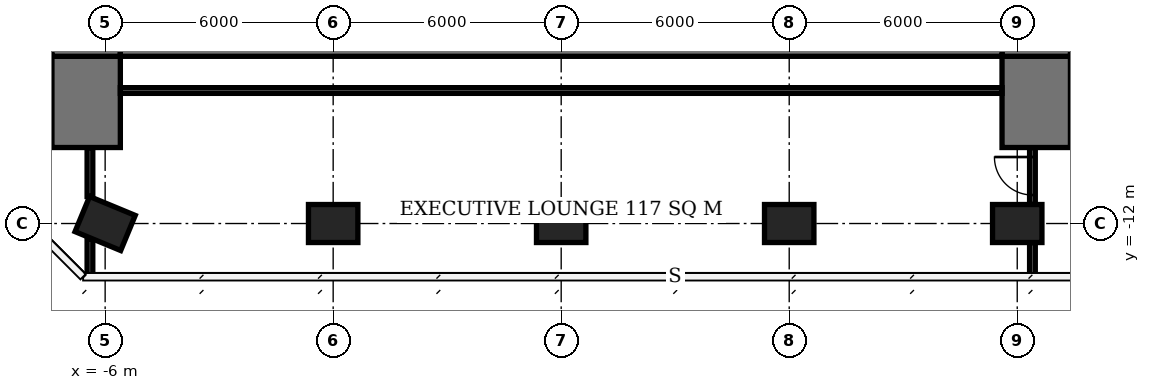
"""IFC4 building model, lengths in metres.
Left out: names, types, materials, properties, quantities, classifications, styles, units other than length and angle.
Written with IfcOpenShell. Run it as: python <this file> out.ifc"""

import sys

from ifc_helpers import new_model, si_unit, direction, frame, frame_2d, origin, origin_2d, place, context, subcontext, project, spatial, rectangle, extrude, element, fill, save


model = new_model("IFC4")
c1 = context("Model", 3, precision=1e-05, world=origin(), true_north=direction((0.0, 1.0)))
c2 = subcontext(c1, "Body", "Model", "MODEL_VIEW")
j1 = project(units=[si_unit("LENGTHUNIT", "METRE"), si_unit("PLANEANGLEUNIT", "RADIAN")], contexts=[c1])
p1 = place(None, origin())
s1 = spatial("IfcSite", under=j1, at=p1, CompositionType="ELEMENT")
p2 = place(p1, origin())
s2 = spatial("IfcBuilding", under=s1, at=p2, CompositionType="ELEMENT")
p3 = place(p2, frame((0.0, 0.0, 252.8)))
s3 = spatial("IfcBuildingStorey", under=s2, at=p3, CompositionType="ELEMENT", Elevation=252.8)
for number, where, z_axis, x_axis in (
    (1, (-6.0, -12.0, 0.0), (0.0, 0.0, 1.0), (-0.924, 0.383, 0.0)),
    (2, (0.0, -12.0, 0.0), (0.0, 0.0, 1.0), (1.0, 0.0, 0.0)),
    (3, (6.0, -12.0, 0.0), (0.0, 0.0, 1.0), (1.0, 0.0, 0.0)),
    (4, (12.0, -12.0, 0.0), (0.0, 0.0, 1.0), (1.0, 0.0, 0.0)),
    (5, (18.0, -12.0, 0.0), (0.0, 0.0, 1.0), (1.0, 0.0, 0.0)),
):
    element("IfcColumn", number, at=place(p3, frame(where, z_axis=z_axis, x_axis=x_axis)), inside=s3, PredefinedType="COLUMN", context=c2, shape_type="SweptSolid", body=[
        extrude(rectangle(XDim=1.3, YDim=1.0, at=origin_2d()), origin(), (0.0, 0.0, 1.0), 3.9),
    ])
p4 = place(p3, frame((-5.6, -6.6, 0.0), z_axis=(0.0, 0.0, 1.0), x_axis=(1.0, 0.0, 0.0)))
e6 = element("IfcWall", 6, at=p4, inside=s3, PredefinedType="SHEAR", context=c2, shape_type="SweptSolid", body=[
    extrude(rectangle(XDim=23.2, YDim=2.0, at=frame_2d((11.6, 0.0))), origin(), (0.0, 0.0, 1.0), 3.9),
])
p5 = place(p3, frame((-6.5, -7.6, 0.0), z_axis=(0.0, 0.0, 1.0), x_axis=(0.0, 1.0, 0.0)))
e7 = element("IfcWall", 7, at=p5, inside=s3, PredefinedType="SHEAR", context=c2, shape_type="SweptSolid", body=[
    extrude(rectangle(XDim=21.2, YDim=1.8, at=frame_2d((10.6, 0.0))), origin(), (0.0, 0.0, 1.0), 3.9),
])
p6 = place(p5, frame((7.8, 0.0, 0.0)))
e8 = element("IfcOpeningElement", 8, at=p6, cuts=e7, PredefinedType="OPENING", context=c2, shape_type="SweptSolid", body=[
    extrude(rectangle(XDim=1.8, YDim=2.4, at=frame_2d((0.9, 1.2))), frame((0.0, 0.91, 0.0), z_axis=(0.0, -1.0, 0.0), x_axis=(1.0, 0.0, 0.0)), (0.0, 0.0, 1.0), 1.82),
])
p7 = place(p3, frame((18.5, -7.6, 0.0), z_axis=(0.0, 0.0, 1.0), x_axis=(0.0, 1.0, 0.0)))
e9 = element("IfcWall", 9, at=p7, inside=s3, PredefinedType="SHEAR", context=c2, shape_type="SweptSolid", body=[
    extrude(rectangle(XDim=21.2, YDim=1.8, at=frame_2d((10.6, 0.0))), origin(), (0.0, 0.0, 1.0), 3.9),
])
p8 = place(p7, frame((9.2, 0.0, 0.0)))
e10 = element("IfcOpeningElement", 10, at=p8, cuts=e9, PredefinedType="OPENING", context=c2, shape_type="SweptSolid", body=[
    extrude(rectangle(XDim=1.8, YDim=2.4, at=frame_2d((0.9, 1.2))), frame((0.0, 0.91, 0.0), z_axis=(0.0, -1.0, 0.0), x_axis=(1.0, 0.0, 0.0)), (0.0, 0.0, 1.0), 1.82),
])
for number, where, z_axis, x_axis in (
    (11, (-6.5, -10.0, 0.0), (0.0, 0.0, 1.0), (0.0, 1.0, 0.0)),
    (12, (18.5, -10.0, 0.0), (0.0, 0.0, 1.0), (0.0, 1.0, 0.0)),
):
    element("IfcWall", number, at=place(p3, frame(where, z_axis=z_axis, x_axis=x_axis)), inside=s3, PredefinedType="SHEAR", context=c2, shape_type="SweptSolid", body=[
        extrude(rectangle(XDim=2.4, YDim=1.8, at=frame_2d((1.2, 0.0))), origin(), (0.0, 0.0, 1.0), 3.9),
    ])
p9 = place(p3, frame((-6.4, -13.375, 0.0), z_axis=(0.0, 0.0, 1.0), x_axis=(0.0, 1.0, 0.0)))
e13 = element("IfcWall", 13, at=p9, inside=s3, PredefinedType="PARTITIONING", context=c2, shape_type="SweptSolid", body=[
    extrude(rectangle(XDim=0.969, YDim=0.15, at=frame_2d((0.484, 0.0))), origin(), (0.0, 0.0, 1.0), 3.65),
])
p10 = place(p3, frame((-6.4, -11.289, 0.0), z_axis=(0.0, 0.0, 1.0), x_axis=(0.0, 1.0, 0.0)))
e14 = element("IfcWall", 14, at=p10, inside=s3, PredefinedType="PARTITIONING", context=c2, shape_type="SweptSolid", body=[
    extrude(rectangle(XDim=1.289, YDim=0.15, at=frame_2d((0.645, 0.0))), origin(), (0.0, 0.0, 1.0), 3.65),
])
p11 = place(p3, frame((-5.6, -8.5, 0.0), z_axis=(0.0, 0.0, 1.0), x_axis=(1.0, 0.0, 0.0)))
e15 = element("IfcWall", 15, at=p11, inside=s3, PredefinedType="PARTITIONING", context=c2, shape_type="SweptSolid", body=[
    extrude(rectangle(XDim=23.2, YDim=0.15, at=frame_2d((11.6, 0.0))), origin(), (0.0, 0.0, 1.0), 3.65),
])
p12 = place(p3, frame((18.4, -13.35, 0.0), z_axis=(0.0, 0.0, 1.0), x_axis=(0.0, 1.0, 0.0)))
e16 = element("IfcWall", 16, at=p12, inside=s3, PredefinedType="PARTITIONING", context=c2, shape_type="SweptSolid", body=[
    extrude(rectangle(XDim=0.85, YDim=0.15, at=frame_2d((0.425, 0.0))), origin(), (0.0, 0.0, 1.0), 3.65),
])
p13 = place(p3, frame((18.4, -11.5, 0.0), z_axis=(0.0, 0.0, 1.0), x_axis=(0.0, 1.0, 0.0)))
e17 = element("IfcWall", 17, at=p13, inside=s3, PredefinedType="PARTITIONING", context=c2, shape_type="SweptSolid", body=[
    extrude(rectangle(XDim=1.5, YDim=0.15, at=frame_2d((0.75, 0.0))), origin(), (0.0, 0.0, 1.0), 3.65),
])
p14 = place(p13, frame((0.25, 0.0, 0.0)))
e18 = element("IfcOpeningElement", 18, at=p14, cuts=e17, PredefinedType="OPENING", context=c2, shape_type="SweptSolid", body=[
    extrude(rectangle(XDim=1.0, YDim=2.1, at=frame_2d((0.5, 1.05))), frame((0.0, 0.085, 0.0), z_axis=(0.0, -1.0, 0.0), x_axis=(1.0, 0.0, 0.0)), (0.0, 0.0, 1.0), 0.17),
])
p15 = place(p14, origin())
e19 = element("IfcDoor", 19, at=p15, inside=s3, OperationType="SINGLE_SWING_RIGHT", PredefinedType="DOOR", context=c2, shape_type="SweptSolid", body=[
    extrude(rectangle(XDim=1.0, YDim=2.1, at=frame_2d((0.5, 1.05))), frame((0.0, 0.025, 0.0), z_axis=(0.0, -1.0, 0.0), x_axis=(1.0, 0.0, 0.0)), (0.0, 0.0, 1.0), 0.05),
])
fill(e18, e19)
save(model, sys.argv[1])
